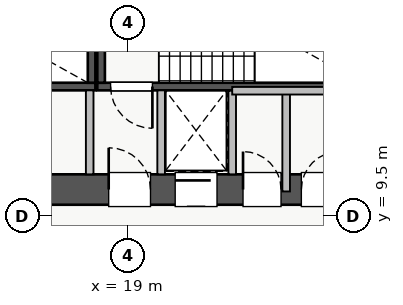
"""IFC4 building model, lengths in metres.
Left out: names, types, materials, properties, quantities, classifications, styles, units other than length and angle.
Written with IfcOpenShell. Run it as: python <this file> out.ifc"""

import sys

from ifc_helpers import new_model, si_unit, direction, frame, frame_2d, origin, place, context, subcontext, project, spatial, rectangle, extrude, source, transform, mapped, element, fill, save


model = new_model("IFC4")
c1 = context("Model", 3, precision=1e-05, world=origin(), true_north=direction((0.0, 1.0)))
c2 = subcontext(c1, "Body", "Model", "MODEL_VIEW")
j1 = project(units=[si_unit("LENGTHUNIT", "METRE"), si_unit("PLANEANGLEUNIT", "RADIAN")], contexts=[c1])
p1 = place(None, origin())
s1 = spatial("IfcSite", under=j1, at=p1, CompositionType="ELEMENT")
p2 = place(p1, origin())
s2 = spatial("IfcBuilding", under=s1, at=p2, CompositionType="ELEMENT")
p3 = place(p2, frame((0.0, 0.0, 73.0)))
s3 = spatial("IfcBuildingStorey", under=s2, at=p3, CompositionType="ELEMENT", Elevation=73.0)
p4 = place(p3, frame((19.88, 12.8, 0.0), z_axis=(0.0, 0.0, 1.0), x_axis=(1.0, 0.0, 0.0)))
e1 = element("IfcWall", 1, at=p4, inside=s3, PredefinedType="SHEAR", context=c2, shape_type="SweptSolid", body=[
    extrude(rectangle(XDim=1.87, YDim=0.18, at=frame_2d((0.935, 0.0))), origin(), (0.0, 0.0, 1.0), 3.07),
])
p5 = place(p3, frame((11.0, 12.91, 0.0), z_axis=(0.0, 0.0, 1.0), x_axis=(1.0, 0.0, 0.0)))
e2 = element("IfcWall", 2, at=p5, inside=s3, PredefinedType="SHEAR", context=c2, shape_type="SweptSolid", body=[
    extrude(rectangle(XDim=7.15, YDim=0.2, at=frame_2d((3.575, 0.0))), origin(), (0.0, 0.0, 1.0), 3.25),
])
p6 = place(p5, frame((0.35, 0.0, 0.0)))
e3 = element("IfcOpeningElement", 3, at=p6, cuts=e2, PredefinedType="OPENING", context=c2, shape_type="SweptSolid", body=[
    extrude(rectangle(XDim=1.1, YDim=2.05, at=frame_2d((0.55, 1.025))), frame((0.0, 0.11, 0.0), z_axis=(0.0, -1.0, 0.0), x_axis=(1.0, 0.0, 0.0)), (0.0, 0.0, 1.0), 0.22),
])
p7 = place(p3, frame((18.05, 13.01, 0.0), z_axis=(0.0, 0.0, 1.0), x_axis=(0.0, 1.0, 0.0)))
e4 = element("IfcWall", 4, at=p7, inside=s3, PredefinedType="SHEAR", context=c2, shape_type="SweptSolid", body=[
    extrude(rectangle(XDim=2.94, YDim=0.2, at=frame_2d((1.47, 0.0))), origin(), (0.0, 0.0, 1.0), 3.25),
])
p8 = place(p3, frame((18.2, 12.91, 0.0), z_axis=(0.0, 0.0, 1.0), x_axis=(1.0, 0.0, 0.0)))
e5 = element("IfcWall", 5, at=p8, inside=s3, PredefinedType="SHEAR", context=c2, shape_type="SweptSolid", body=[
    extrude(rectangle(XDim=7.15, YDim=0.2, at=frame_2d((3.575, 0.0))), origin(), (0.0, 0.0, 1.0), 3.25),
])
p9 = place(p8, frame((0.35, 0.0, 0.0)))
e6 = element("IfcOpeningElement", 6, at=p9, cuts=e5, PredefinedType="OPENING", context=c2, shape_type="SweptSolid", body=[
    extrude(rectangle(XDim=1.1, YDim=2.05, at=frame_2d((0.55, 1.025))), frame((0.0, 0.11, 0.0), z_axis=(0.0, -1.0, 0.0), x_axis=(1.0, 0.0, 0.0)), (0.0, 0.0, 1.0), 0.22),
])
p10 = place(p3, frame((18.3, 13.01, 0.0), z_axis=(0.0, 0.0, 1.0), x_axis=(0.0, 1.0, 0.0)))
e7 = element("IfcWall", 7, at=p10, inside=s3, PredefinedType="SHEAR", context=c2, shape_type="SweptSolid", body=[
    extrude(rectangle(XDim=2.94, YDim=0.2, at=frame_2d((1.47, 0.0))), origin(), (0.0, 0.0, 1.0), 3.25),
])
p11 = place(p3, frame((10.2, 10.2, 0.0), z_axis=(0.0, 0.0, 1.0), x_axis=(1.0, 0.0, 0.0)))
e8 = element("IfcWall", 8, at=p11, inside=s3, PredefinedType="SHEAR", context=c2, shape_type="SweptSolid", body=[
    extrude(rectangle(XDim=17.6, YDim=0.8, at=frame_2d((8.8, 0.0))), origin(), (0.0, 0.0, 1.0), 3.25),
])
p12 = place(p11, frame((1.15, 0.0, 0.0)))
e9 = element("IfcOpeningElement", 9, at=p12, cuts=e8, PredefinedType="OPENING", context=c2, shape_type="SweptSolid", body=[
    extrude(rectangle(XDim=1.1, YDim=2.05, at=frame_2d((0.55, 1.025))), frame((0.0, 0.41, 0.0), z_axis=(0.0, -1.0, 0.0), x_axis=(1.0, 0.0, 0.0)), (0.0, 0.0, 1.0), 0.82),
])
p13 = place(p11, frame((8.3, 0.0, 0.0)))
e10 = element("IfcOpeningElement", 10, at=p13, cuts=e8, PredefinedType="OPENING", context=c2, shape_type="SweptSolid", body=[
    extrude(rectangle(XDim=1.1, YDim=2.05, at=frame_2d((0.55, 1.025))), frame((0.0, 0.41, 0.0), z_axis=(0.0, -1.0, 0.0), x_axis=(1.0, 0.0, 0.0)), (0.0, 0.0, 1.0), 0.82),
])
p14 = place(p11, frame((10.05, 0.0, 0.0)))
e11 = element("IfcOpeningElement", 11, at=p14, cuts=e8, PredefinedType="OPENING", context=c2, shape_type="SweptSolid", body=[
    extrude(rectangle(XDim=1.1, YDim=2.05, at=frame_2d((0.55, 1.025))), frame((0.0, 0.41, 0.0), z_axis=(0.0, -1.0, 0.0), x_axis=(1.0, 0.0, 0.0)), (0.0, 0.0, 1.0), 0.82),
])
p15 = place(p11, frame((14.74, 0.0, 0.0)))
e12 = element("IfcOpeningElement", 12, at=p15, cuts=e8, PredefinedType="OPENING", context=c2, shape_type="SweptSolid", body=[
    extrude(rectangle(XDim=1.0, YDim=2.05, at=frame_2d((0.5, 1.025))), frame((0.0, 0.41, 0.0), z_axis=(0.0, -1.0, 0.0), x_axis=(1.0, 0.0, 0.0)), (0.0, 0.0, 1.0), 0.82),
])
p16 = place(p11, frame((11.835, 0.0, 0.0)))
e13 = element("IfcOpeningElement", 13, at=p16, cuts=e8, PredefinedType="OPENING", context=c2, shape_type="SweptSolid", body=[
    extrude(rectangle(XDim=1.0, YDim=2.05, at=frame_2d((0.5, 1.025))), frame((0.0, 0.41, 0.0), z_axis=(0.0, -1.0, 0.0), x_axis=(1.0, 0.0, 0.0)), (0.0, 0.0, 1.0), 0.82),
])
p17 = place(p11, frame((13.37, 0.0, 0.0)))
e14 = element("IfcOpeningElement", 14, at=p17, cuts=e8, PredefinedType="OPENING", context=c2, shape_type="SweptSolid", body=[
    extrude(rectangle(XDim=1.0, YDim=2.05, at=frame_2d((0.5, 1.025))), frame((0.0, 0.41, 0.0), z_axis=(0.0, -1.0, 0.0), x_axis=(1.0, 0.0, 0.0)), (0.0, 0.0, 1.0), 0.82),
])
for number, where, z_axis, x_axis in (
    (15, (18.0, 10.6, 0.0), (0.0, 0.0, 1.0), (0.0, 1.0, 0.0)),
    (16, (19.88, 10.6, 0.0), (0.0, 0.0, 1.0), (0.0, 1.0, 0.0)),
):
    element("IfcWall", number, at=place(p3, frame(where, z_axis=z_axis, x_axis=x_axis)), inside=s3, PredefinedType="PARTITIONING", context=c2, shape_type="SweptSolid", body=[
        extrude(rectangle(XDim=2.21, YDim=0.2, at=frame_2d((1.105, 0.0))), origin(), (0.0, 0.0, 1.0), 3.07),
    ])
p18 = place(p3, frame((21.75, 10.6, 0.0), z_axis=(0.0, 0.0, 1.0), x_axis=(0.0, 1.0, 0.0)))
e17 = element("IfcWall", 17, at=p18, inside=s3, PredefinedType="PARTITIONING", context=c2, shape_type="SweptSolid", body=[
    extrude(rectangle(XDim=2.2, YDim=0.2, at=frame_2d((1.1, 0.0))), origin(), (0.0, 0.0, 1.0), 3.07),
])
p19 = place(p3, frame((23.17, 10.15, 0.0), z_axis=(0.0, 0.0, 1.0), x_axis=(0.0, 1.0, 0.0)))
e18 = element("IfcWall", 18, at=p19, inside=s3, PredefinedType="PARTITIONING", context=c2, shape_type="SweptSolid", body=[
    extrude(rectangle(XDim=2.65, YDim=0.2, at=frame_2d((1.325, 0.0))), origin(), (0.0, 0.0, 1.0), 3.07),
])
p20 = place(p3, frame((21.75, 12.8, 0.0), z_axis=(0.0, 0.0, 1.0), x_axis=(1.0, 0.0, 0.0)))
e19 = element("IfcWall", 19, at=p20, inside=s3, PredefinedType="PARTITIONING", context=c2, shape_type="SweptSolid", body=[
    extrude(rectangle(XDim=5.17, YDim=0.2, at=frame_2d((2.585, 0.0))), origin(), (0.0, 0.0, 1.0), 3.07),
])
m1 = source(origin(), c2, "Body", "SweptSolid", [
    extrude(rectangle(XDim=1.1, YDim=2.05, at=frame_2d((0.55, 1.025))), frame((0.0, 0.025, 0.0), z_axis=(0.0, -1.0, 0.0), x_axis=(1.0, 0.0, 0.0)), (0.0, 0.0, 1.0), 0.05),
])
p21 = place(p13, origin())
e20 = element("IfcDoor", 20, at=p21, inside=s3, OperationType="SINGLE_SWING_LEFT", PredefinedType="DOOR", context=c2, shape_type="MappedRepresentation", body=[
    mapped(m1, transform((0.0, 0.0, 0.0), x_axis=(1.0, 0.0, 0.0), y_axis=(0.0, 1.0, 0.0), z_axis=(0.0, 0.0, 1.0), scale=1.0)),
])
fill(e10, e20)
p22 = place(p9, frame((1.1, 0.0, 0.0), z_axis=(0.0, 0.0, 1.0), x_axis=(-1.0, 0.0, 0.0)))
e21 = element("IfcDoor", 21, at=p22, inside=s3, OperationType="SINGLE_SWING_RIGHT", PredefinedType="DOOR", context=c2, shape_type="MappedRepresentation", body=[
    mapped(m1, transform((0.0, 0.0, 0.0), x_axis=(1.0, 0.0, 0.0), y_axis=(0.0, 1.0, 0.0), z_axis=(0.0, 0.0, 1.0), scale=1.0)),
])
fill(e6, e21)
p23 = place(p14, origin())
e22 = element("IfcDoor", 22, at=p23, inside=s3, OperationType="SLIDING_TO_RIGHT", PredefinedType="DOOR", context=c2, shape_type="MappedRepresentation", body=[
    mapped(m1, transform((0.0, 0.0, 0.0), x_axis=(1.0, 0.0, 0.0), y_axis=(0.0, 1.0, 0.0), z_axis=(0.0, 0.0, 1.0), scale=1.0)),
])
fill(e11, e22)
m2 = source(origin(), c2, "Body", "SweptSolid", [
    extrude(rectangle(XDim=1.0, YDim=2.05, at=frame_2d((0.5, 1.025))), frame((0.0, 0.025, 0.0), z_axis=(0.0, -1.0, 0.0), x_axis=(1.0, 0.0, 0.0)), (0.0, 0.0, 1.0), 0.05),
])
p24 = place(p16, origin())
e23 = element("IfcDoor", 23, at=p24, inside=s3, OperationType="SINGLE_SWING_LEFT", PredefinedType="DOOR", context=c2, shape_type="MappedRepresentation", body=[
    mapped(m2, transform((0.0, 0.0, 0.0), x_axis=(1.0, 0.0, 0.0), y_axis=(0.0, 1.0, 0.0), z_axis=(0.0, 0.0, 1.0), scale=1.0)),
])
fill(e13, e23)
p25 = place(p17, origin())
e24 = element("IfcDoor", 24, at=p25, inside=s3, OperationType="SINGLE_SWING_RIGHT", PredefinedType="DOOR", context=c2, shape_type="MappedRepresentation", body=[
    mapped(m2, transform((0.0, 0.0, 0.0), x_axis=(1.0, 0.0, 0.0), y_axis=(0.0, 1.0, 0.0), z_axis=(0.0, 0.0, 1.0), scale=1.0)),
])
fill(e14, e24)
save(model, sys.argv[1])
